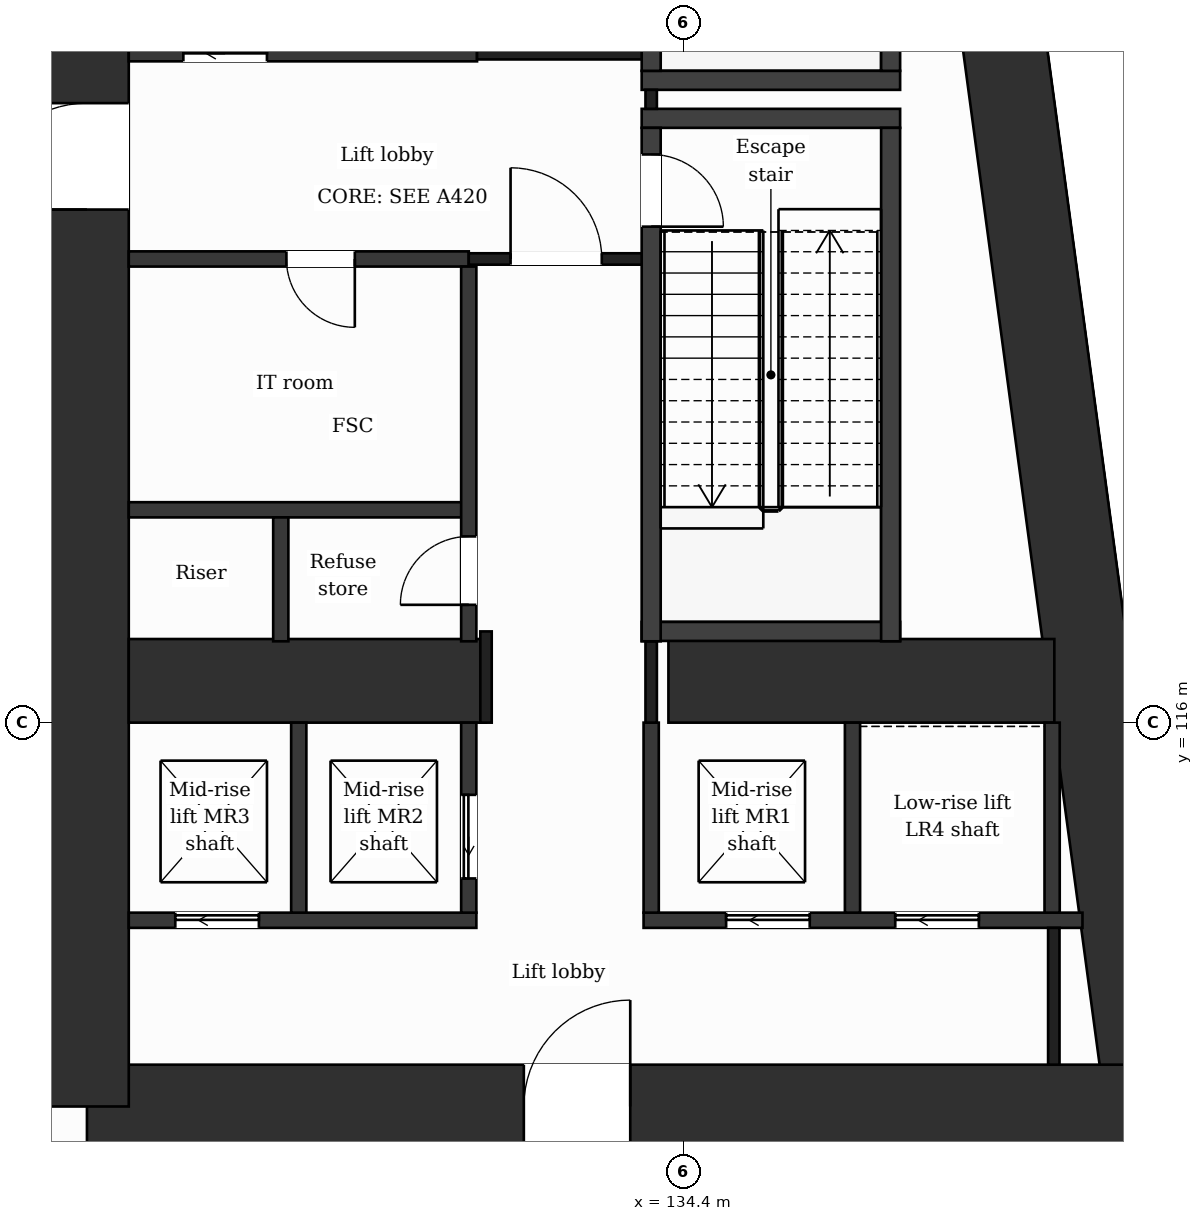
"""IFC4 building model, lengths in metres.
Left out: names, types, materials, properties, quantities, classifications, styles, units other than length and angle.
Written with IfcOpenShell. Run it as: python <this file> out.ifc"""

import sys

from ifc_helpers import new_model, si_unit, direction, frame, frame_2d, origin, place, context, subcontext, project, spatial, rectangle, extrude, element, fill, save


model = new_model("IFC4")
c1 = context("Model", 3, precision=1e-05, world=origin(), true_north=direction((0.0, 1.0)))
c2 = subcontext(c1, "Body", "Model", "MODEL_VIEW")
j1 = project(units=[si_unit("LENGTHUNIT", "METRE"), si_unit("PLANEANGLEUNIT", "RADIAN")], contexts=[c1])
p1 = place(None, origin())
s1 = spatial("IfcSite", under=j1, at=p1, CompositionType="ELEMENT")
p2 = place(p1, origin())
s2 = spatial("IfcBuilding", under=s1, at=p2, CompositionType="ELEMENT")
p3 = place(p2, frame((0.0, 0.0, 86.0)))
s3 = spatial("IfcBuildingStorey", under=s2, at=p3, CompositionType="ELEMENT", Elevation=86.0)
p4 = place(p3, frame((137.688, 131.85, 0.0), z_axis=(0.0, 0.0, 1.0), x_axis=(0.133411793472, -0.991060691059, 0.0)))
e1 = element("IfcWall", 1, at=p4, inside=s3, PredefinedType="SHEAR", context=c2, shape_type="SweptSolid", body=[
    extrude(rectangle(XDim=21.089, YDim=1.1, at=frame_2d((10.544, 0.0))), origin(), (0.0, 0.0, 1.0), 5.0),
])
p5 = place(p3, frame((140.502, 110.95, 0.0), z_axis=(0.0, 0.0, 1.0), x_axis=(-1.0, 0.0, 0.0)))
e2 = element("IfcWall", 2, at=p5, inside=s3, PredefinedType="SHEAR", context=c2, shape_type="SweptSolid", body=[
    extrude(rectangle(XDim=13.952, YDim=1.1, at=frame_2d((6.976, 0.0))), origin(), (0.0, 0.0, 1.0), 5.0),
])
p6 = place(p5, frame((6.804, 0.0, 0.0)))
e3 = element("IfcOpeningElement", 3, at=p6, cuts=e2, PredefinedType="OPENING", context=c2, shape_type="SweptSolid", body=[
    extrude(rectangle(XDim=1.4, YDim=2.1, at=frame_2d((0.7, 1.05))), frame((0.0, 0.56, 0.0), z_axis=(0.0, -1.0, 0.0), x_axis=(1.0, 0.0, 0.0)), (0.0, 0.0, 1.0), 1.12),
])
p7 = place(p3, frame((126.55, 110.95, 0.0), z_axis=(0.0, 0.0, 1.0), x_axis=(0.0, 1.0, 0.0)))
e4 = element("IfcWall", 4, at=p7, inside=s3, PredefinedType="SHEAR", context=c2, shape_type="SweptSolid", body=[
    extrude(rectangle(XDim=20.9, YDim=1.1, at=frame_2d((10.45, 0.0))), origin(), (0.0, 0.0, 1.0), 5.0),
])
p8 = place(p7, frame((11.8, 0.0, 0.0)))
e5 = element("IfcOpeningElement", 5, at=p8, cuts=e4, PredefinedType="OPENING", context=c2, shape_type="SweptSolid", body=[
    extrude(rectangle(XDim=1.4, YDim=2.1, at=frame_2d((0.7, 1.05))), frame((0.0, 0.56, 0.0), z_axis=(0.0, -1.0, 0.0), x_axis=(1.0, 0.0, 0.0)), (0.0, 0.0, 1.0), 1.12),
])
p9 = place(p3, frame((127.1, 116.55, 0.0), z_axis=(0.0, 0.0, 1.0), x_axis=(1.0, 0.0, 0.0)))
e6 = element("IfcWall", 6, at=p9, inside=s3, PredefinedType="SHEAR", context=c2, shape_type="SweptSolid", body=[
    extrude(rectangle(XDim=4.7, YDim=1.1, at=frame_2d((2.35, 0.0))), origin(), (0.0, 0.0, 1.0), 5.0),
])
p10 = place(p3, frame((134.2, 116.55, 0.0), z_axis=(0.0, 0.0, 1.0), x_axis=(1.0, 0.0, 0.0)))
e7 = element("IfcWall", 7, at=p10, inside=s3, PredefinedType="SHEAR", context=c2, shape_type="SweptSolid", body=[
    extrude(rectangle(XDim=5.077, YDim=1.1, at=frame_2d((2.539, 0.0))), origin(), (0.0, 0.0, 1.0), 5.0),
])
p11 = place(p3, frame((127.1, 113.4, 0.0), z_axis=(0.0, 0.0, 1.0), x_axis=(1.0, 0.0, 0.0)))
e8 = element("IfcWall", 8, at=p11, inside=s3, PredefinedType="PARTITIONING", context=c2, shape_type="SweptSolid", body=[
    extrude(rectangle(XDim=4.573, YDim=0.2, at=frame_2d((2.287, 0.0))), origin(), (0.0, 0.0, 1.0), 4.68),
])
p12 = place(p11, frame((0.612, 0.0, 0.0)))
e9 = element("IfcOpeningElement", 9, at=p12, cuts=e8, PredefinedType="OPENING", context=c2, shape_type="SweptSolid", body=[
    extrude(rectangle(XDim=1.1, YDim=2.1, at=frame_2d((0.55, 1.05))), frame((0.0, 0.11, 0.0), z_axis=(0.0, -1.0, 0.0), x_axis=(1.0, 0.0, 0.0)), (0.0, 0.0, 1.0), 0.22),
])
p13 = place(p3, frame((133.873, 113.4, 0.0), z_axis=(0.0, 0.0, 1.0), x_axis=(1.0, 0.0, 0.0)))
e10 = element("IfcWall", 10, at=p13, inside=s3, PredefinedType="PARTITIONING", context=c2, shape_type="SweptSolid", body=[
    extrude(rectangle(XDim=5.774, YDim=0.2, at=frame_2d((2.887, 0.0))), origin(), (0.0, 0.0, 1.0), 4.68),
])
p14 = place(p13, frame((3.311, 0.0, 0.0)))
e11 = element("IfcOpeningElement", 11, at=p14, cuts=e10, PredefinedType="OPENING", context=c2, shape_type="SweptSolid", body=[
    extrude(rectangle(XDim=1.1, YDim=2.1, at=frame_2d((0.55, 1.05))), frame((0.0, 0.11, 0.0), z_axis=(0.0, -1.0, 0.0), x_axis=(1.0, 0.0, 0.0)), (0.0, 0.0, 1.0), 0.22),
])
p15 = place(p13, frame((1.086, 0.0, 0.0)))
e12 = element("IfcOpeningElement", 12, at=p15, cuts=e10, PredefinedType="OPENING", context=c2, shape_type="SweptSolid", body=[
    extrude(rectangle(XDim=1.1, YDim=2.1, at=frame_2d((0.55, 1.05))), frame((0.0, 0.11, 0.0), z_axis=(0.0, -1.0, 0.0), x_axis=(1.0, 0.0, 0.0)), (0.0, 0.0, 1.0), 0.22),
])
p16 = place(p3, frame((133.848, 117.2, 0.0), z_axis=(0.0, 0.0, 1.0), x_axis=(1.0, 0.0, 0.0)))
e13 = element("IfcWall", 13, at=p16, inside=s3, PredefinedType="PARTITIONING", context=c2, shape_type="SweptSolid", body=[
    extrude(rectangle(XDim=3.4, YDim=0.25, at=frame_2d((1.7, 0.0))), origin(), (0.0, 0.0, 1.0), 4.68),
])
p17 = place(p3, frame((127.1, 118.8, 0.0), z_axis=(0.0, 0.0, 1.0), x_axis=(1.0, 0.0, 0.0)))
e14 = element("IfcWall", 14, at=p17, inside=s3, PredefinedType="PARTITIONING", context=c2, shape_type="SweptSolid", body=[
    extrude(rectangle(XDim=4.473, YDim=0.2, at=frame_2d((2.236, 0.0))), origin(), (0.0, 0.0, 1.0), 4.68),
])
p18 = place(p3, frame((127.1, 122.1, 0.0), z_axis=(0.0, 0.0, 1.0), x_axis=(1.0, 0.0, 0.0)))
e15 = element("IfcWall", 15, at=p18, inside=s3, PredefinedType="PARTITIONING", context=c2, shape_type="SweptSolid", body=[
    extrude(rectangle(XDim=4.473, YDim=0.2, at=frame_2d((2.236, 0.0))), origin(), (0.0, 0.0, 1.0), 4.68),
])
p19 = place(p18, frame((2.074, 0.0, 0.0)))
e16 = element("IfcOpeningElement", 16, at=p19, cuts=e15, PredefinedType="OPENING", context=c2, shape_type="SweptSolid", body=[
    extrude(rectangle(XDim=0.9, YDim=2.1, at=frame_2d((0.45, 1.05))), frame((0.0, 0.11, 0.0), z_axis=(0.0, -1.0, 0.0), x_axis=(1.0, 0.0, 0.0)), (0.0, 0.0, 1.0), 0.22),
])
p20 = place(p3, frame((131.573, 122.1, 0.0), z_axis=(0.0, 0.0, 1.0), x_axis=(1.0, 0.0, 0.0)))
e17 = element("IfcWall", 17, at=p20, inside=s3, PredefinedType="PARTITIONING", context=c2, shape_type="SweptSolid", body=[
    extrude(rectangle(XDim=2.4, YDim=0.15, at=frame_2d((1.2, 0.0))), origin(), (0.0, 0.0, 1.0), 4.68),
])
p21 = place(p20, frame((0.55, 0.0, 0.0)))
e18 = element("IfcOpeningElement", 18, at=p21, cuts=e17, PredefinedType="OPENING", context=c2, shape_type="SweptSolid", body=[
    extrude(rectangle(XDim=1.2, YDim=2.1, at=frame_2d((0.6, 1.05))), frame((0.0, 0.085, 0.0), z_axis=(0.0, -1.0, 0.0), x_axis=(1.0, 0.0, 0.0)), (0.0, 0.0, 1.0), 0.17),
])
for number, where, z_axis, x_axis in (
    (19, (133.848, 123.95, 0.0), (0.0, 0.0, 1.0), (1.0, 0.0, 0.0)),
    (20, (133.848, 124.45, 0.0), (0.0, 0.0, 1.0), (1.0, 0.0, 0.0)),
):
    element("IfcWall", number, at=place(p3, frame(where, z_axis=z_axis, x_axis=x_axis)), inside=s3, PredefinedType="PARTITIONING", context=c2, shape_type="SweptSolid", body=[
        extrude(rectangle(XDim=3.4, YDim=0.25, at=frame_2d((1.7, 0.0))), origin(), (0.0, 0.0, 1.0), 4.68),
    ])
p22 = place(p3, frame((127.1, 124.8, 0.0), z_axis=(0.0, 0.0, 1.0), x_axis=(1.0, 0.0, 0.0)))
e21 = element("IfcWall", 21, at=p22, inside=s3, PredefinedType="PARTITIONING", context=c2, shape_type="SweptSolid", body=[
    extrude(rectangle(XDim=4.582, YDim=0.2, at=frame_2d((2.291, 0.0))), origin(), (0.0, 0.0, 1.0), 4.68),
])
p23 = place(p22, frame((0.718, 0.0, 0.0)))
e22 = element("IfcOpeningElement", 22, at=p23, cuts=e21, PredefinedType="OPENING", context=c2, shape_type="SweptSolid", body=[
    extrude(rectangle(XDim=1.1, YDim=2.1, at=frame_2d((0.55, 1.05))), frame((0.0, 0.11, 0.0), z_axis=(0.0, -1.0, 0.0), x_axis=(1.0, 0.0, 0.0)), (0.0, 0.0, 1.0), 0.22),
])
p24 = place(p3, frame((131.682, 124.8, 0.0), z_axis=(0.0, 0.0, 1.0), x_axis=(1.0, 0.0, 0.0)))
e23 = element("IfcWall", 23, at=p24, inside=s3, PredefinedType="PARTITIONING", context=c2, shape_type="SweptSolid", body=[
    extrude(rectangle(XDim=2.416, YDim=0.15, at=frame_2d((1.208, 0.0))), origin(), (0.0, 0.0, 1.0), 4.68),
])
p25 = place(p3, frame((129.1, 117.07, 0.0), z_axis=(0.0, 0.0, 1.0), x_axis=(0.0, 1.0, 0.0)))
e24 = element("IfcWall", 24, at=p25, inside=s3, PredefinedType="PARTITIONING", context=c2, shape_type="SweptSolid", body=[
    extrude(rectangle(XDim=1.63, YDim=0.2, at=frame_2d((0.815, 0.0))), origin(), (0.0, 0.0, 1.0), 4.68),
])
p26 = place(p3, frame((129.336, 113.5, 0.0), z_axis=(0.0, 0.0, 1.0), x_axis=(0.0, 1.0, 0.0)))
e25 = element("IfcWall", 25, at=p26, inside=s3, PredefinedType="PARTITIONING", context=c2, shape_type="SweptSolid", body=[
    extrude(rectangle(XDim=2.5, YDim=0.2, at=frame_2d((1.25, 0.0))), origin(), (0.0, 0.0, 1.0), 4.68),
])
p27 = place(p3, frame((131.573, 113.5, 0.0), z_axis=(0.0, 0.0, 1.0), x_axis=(0.0, 1.0, 0.0)))
e26 = element("IfcWall", 26, at=p27, inside=s3, PredefinedType="PARTITIONING", context=c2, shape_type="SweptSolid", body=[
    extrude(rectangle(XDim=2.5, YDim=0.2, at=frame_2d((1.25, 0.0))), origin(), (0.0, 0.0, 1.0), 4.68),
])
p28 = place(p27, frame((0.45, 0.0, 0.0)))
e27 = element("IfcOpeningElement", 27, at=p28, cuts=e26, PredefinedType="OPENING", context=c2, shape_type="SweptSolid", body=[
    extrude(rectangle(XDim=1.1, YDim=2.1, at=frame_2d((0.55, 1.05))), frame((0.0, 0.11, 0.0), z_axis=(0.0, -1.0, 0.0), x_axis=(1.0, 0.0, 0.0)), (0.0, 0.0, 1.0), 0.22),
])
p29 = place(p3, frame((131.573, 117.07, 0.0), z_axis=(0.0, 0.0, 1.0), x_axis=(0.0, 1.0, 0.0)))
e28 = element("IfcWall", 28, at=p29, inside=s3, PredefinedType="PARTITIONING", context=c2, shape_type="SweptSolid", body=[
    extrude(rectangle(XDim=4.93, YDim=0.2, at=frame_2d((2.465, 0.0))), origin(), (0.0, 0.0, 1.0), 4.68),
])
p30 = place(p29, frame((0.48, 0.0, 0.0)))
e29 = element("IfcOpeningElement", 29, at=p30, cuts=e28, PredefinedType="OPENING", context=c2, shape_type="SweptSolid", body=[
    extrude(rectangle(XDim=0.9, YDim=2.1, at=frame_2d((0.45, 1.05))), frame((0.0, 0.11, 0.0), z_axis=(0.0, -1.0, 0.0), x_axis=(1.0, 0.0, 0.0)), (0.0, 0.0, 1.0), 0.22),
])
p31 = place(p3, frame((131.8, 116.0, 0.0), z_axis=(0.0, 0.0, 1.0), x_axis=(0.0, 1.0, 0.0)))
e30 = element("IfcWall", 30, at=p31, inside=s3, PredefinedType="PARTITIONING", context=c2, shape_type="SweptSolid", body=[
    extrude(rectangle(XDim=1.2, YDim=0.15, at=frame_2d((0.6, 0.0))), origin(), (0.0, 0.0, 1.0), 4.68),
])
p32 = place(p3, frame((133.973, 113.5, 0.0), z_axis=(0.0, 0.0, 1.0), x_axis=(0.0, 1.0, 0.0)))
e31 = element("IfcWall", 31, at=p32, inside=s3, PredefinedType="PARTITIONING", context=c2, shape_type="SweptSolid", body=[
    extrude(rectangle(XDim=2.5, YDim=0.2, at=frame_2d((1.25, 0.0))), origin(), (0.0, 0.0, 1.0), 4.68),
])
p33 = place(p3, frame((133.973, 116.0, 0.0), z_axis=(0.0, 0.0, 1.0), x_axis=(0.0, 1.0, 0.0)))
e32 = element("IfcWall", 32, at=p33, inside=s3, PredefinedType="PARTITIONING", context=c2, shape_type="SweptSolid", body=[
    extrude(rectangle(XDim=1.07, YDim=0.15, at=frame_2d((0.535, 0.0))), origin(), (0.0, 0.0, 1.0), 4.68),
])
p34 = place(p3, frame((133.973, 124.075, 0.0), z_axis=(0.0, 0.0, 1.0), x_axis=(0.0, 1.0, 0.0)))
e33 = element("IfcWall", 33, at=p34, inside=s3, PredefinedType="PARTITIONING", context=c2, shape_type="SweptSolid", body=[
    extrude(rectangle(XDim=0.25, YDim=0.15, at=frame_2d((0.125, 0.0))), origin(), (0.0, 0.0, 1.0), 4.68),
])
p35 = place(p3, frame((133.973, 117.07, 0.0), z_axis=(0.0, 0.0, 1.0), x_axis=(0.0, 1.0, 0.0)))
e34 = element("IfcWall", 34, at=p35, inside=s3, PredefinedType="PARTITIONING", context=c2, shape_type="SweptSolid", body=[
    extrude(rectangle(XDim=6.755, YDim=0.25, at=frame_2d((3.377, 0.0))), origin(), (0.0, 0.0, 1.0), 4.68),
])
p36 = place(p35, frame((5.455, 0.0, 0.0)))
e35 = element("IfcOpeningElement", 35, at=p36, cuts=e34, PredefinedType="OPENING", context=c2, shape_type="SweptSolid", body=[
    extrude(rectangle(XDim=0.95, YDim=2.1, at=frame_2d((0.475, 1.05))), frame((0.0, 0.135, 0.0), z_axis=(0.0, -1.0, 0.0), x_axis=(1.0, 0.0, 0.0)), (0.0, 0.0, 1.0), 0.27),
])
p37 = place(p3, frame((133.973, 124.575, 0.0), z_axis=(0.0, 0.0, 1.0), x_axis=(0.0, 1.0, 0.0)))
e36 = element("IfcWall", 36, at=p37, inside=s3, PredefinedType="PARTITIONING", context=c2, shape_type="SweptSolid", body=[
    extrude(rectangle(XDim=6.755, YDim=0.25, at=frame_2d((3.377, 0.0))), origin(), (0.0, 0.0, 1.0), 4.68),
])
p38 = place(p37, frame((5.325, 0.0, 0.0)))
e37 = element("IfcOpeningElement", 37, at=p38, cuts=e36, PredefinedType="OPENING", context=c2, shape_type="SweptSolid", body=[
    extrude(rectangle(XDim=1.0, YDim=2.1, at=frame_2d((0.5, 1.05))), frame((0.0, 0.135, 0.0), z_axis=(0.0, -1.0, 0.0), x_axis=(1.0, 0.0, 0.0)), (0.0, 0.0, 1.0), 0.27),
])
p39 = place(p3, frame((136.622, 113.5, 0.0), z_axis=(0.0, 0.0, 1.0), x_axis=(0.0, 1.0, 0.0)))
e38 = element("IfcWall", 38, at=p39, inside=s3, PredefinedType="PARTITIONING", context=c2, shape_type="SweptSolid", body=[
    extrude(rectangle(XDim=2.5, YDim=0.2, at=frame_2d((1.25, 0.0))), origin(), (0.0, 0.0, 1.0), 4.68),
])
p40 = place(p3, frame((137.123, 117.07, 0.0), z_axis=(0.0, 0.0, 1.0), x_axis=(0.0, 1.0, 0.0)))
e39 = element("IfcWall", 39, at=p40, inside=s3, PredefinedType="PARTITIONING", context=c2, shape_type="SweptSolid", body=[
    extrude(rectangle(XDim=6.755, YDim=0.25, at=frame_2d((3.377, 0.0))), origin(), (0.0, 0.0, 1.0), 4.68),
])
p41 = place(p3, frame((137.123, 124.575, 0.0), z_axis=(0.0, 0.0, 1.0), x_axis=(0.0, 1.0, 0.0)))
e40 = element("IfcWall", 40, at=p41, inside=s3, PredefinedType="PARTITIONING", context=c2, shape_type="SweptSolid", body=[
    extrude(rectangle(XDim=6.5, YDim=0.25, at=frame_2d((3.25, 0.0))), origin(), (0.0, 0.0, 1.0), 4.68),
])
p42 = place(p3, frame((139.248, 113.5, 0.0), z_axis=(0.0, 0.0, 1.0), x_axis=(0.0, 1.0, 0.0)))
e41 = element("IfcWall", 41, at=p42, inside=s3, PredefinedType="PARTITIONING", context=c2, shape_type="SweptSolid", body=[
    extrude(rectangle(XDim=2.5, YDim=0.2, at=frame_2d((1.25, 0.0))), origin(), (0.0, 0.0, 1.0), 4.68),
])
p43 = place(p3, frame((139.27, 111.5, 0.0), z_axis=(0.0, 0.0, 1.0), x_axis=(0.0, 1.0, 0.0)))
e42 = element("IfcWall", 42, at=p43, inside=s3, PredefinedType="PARTITIONING", context=c2, shape_type="SweptSolid", body=[
    extrude(rectangle(XDim=1.8, YDim=0.15, at=frame_2d((0.9, 0.0))), origin(), (0.0, 0.0, 1.0), 4.68),
])
p44 = place(p21, origin())
e43 = element("IfcDoor", 43, at=p44, inside=s3, OperationType="SINGLE_SWING_LEFT", PredefinedType="DOOR", context=c2, shape_type="SweptSolid", body=[
    extrude(rectangle(XDim=1.2, YDim=2.1, at=frame_2d((0.6, 1.05))), frame((0.0, 0.025, 0.0), z_axis=(0.0, -1.0, 0.0), x_axis=(1.0, 0.0, 0.0)), (0.0, 0.0, 1.0), 0.05),
])
fill(e18, e43)
p45 = place(p23, origin())
e44 = element("IfcDoor", 44, at=p45, inside=s3, OperationType="SLIDING_TO_LEFT", PredefinedType="DOOR", context=c2, shape_type="SweptSolid", body=[
    extrude(rectangle(XDim=1.1, YDim=2.1, at=frame_2d((0.55, 1.05))), frame((0.0, 0.025, 0.0), z_axis=(0.0, -1.0, 0.0), x_axis=(1.0, 0.0, 0.0)), (0.0, 0.0, 1.0), 0.05),
])
fill(e22, e44)
p46 = place(p19, origin())
e45 = element("IfcDoor", 45, at=p46, inside=s3, OperationType="SINGLE_SWING_RIGHT", PredefinedType="DOOR", context=c2, shape_type="SweptSolid", body=[
    extrude(rectangle(XDim=0.9, YDim=2.1, at=frame_2d((0.45, 1.05))), frame((0.0, 0.025, 0.0), z_axis=(0.0, -1.0, 0.0), x_axis=(1.0, 0.0, 0.0)), (0.0, 0.0, 1.0), 0.05),
])
fill(e16, e45)
p47 = place(p36, origin())
e46 = element("IfcDoor", 46, at=p47, inside=s3, OperationType="SINGLE_SWING_LEFT", PredefinedType="DOOR", context=c2, shape_type="SweptSolid", body=[
    extrude(rectangle(XDim=0.95, YDim=2.1, at=frame_2d((0.475, 1.05))), frame((0.0, 0.025, 0.0), z_axis=(0.0, -1.0, 0.0), x_axis=(1.0, 0.0, 0.0)), (0.0, 0.0, 1.0), 0.05),
])
fill(e35, e46)
p48 = place(p30, origin())
e47 = element("IfcDoor", 47, at=p48, inside=s3, OperationType="SINGLE_SWING_LEFT", PredefinedType="DOOR", context=c2, shape_type="SweptSolid", body=[
    extrude(rectangle(XDim=0.9, YDim=2.1, at=frame_2d((0.45, 1.05))), frame((0.0, 0.025, 0.0), z_axis=(0.0, -1.0, 0.0), x_axis=(1.0, 0.0, 0.0)), (0.0, 0.0, 1.0), 0.05),
])
fill(e29, e47)
p49 = place(p14, origin())
e48 = element("IfcDoor", 48, at=p49, inside=s3, OperationType="SLIDING_TO_LEFT", PredefinedType="DOOR", context=c2, shape_type="SweptSolid", body=[
    extrude(rectangle(XDim=1.1, YDim=2.1, at=frame_2d((0.55, 1.05))), frame((0.0, 0.025, 0.0), z_axis=(0.0, -1.0, 0.0), x_axis=(1.0, 0.0, 0.0)), (0.0, 0.0, 1.0), 0.05),
])
fill(e11, e48)
p50 = place(p15, origin())
e49 = element("IfcDoor", 49, at=p50, inside=s3, OperationType="SLIDING_TO_LEFT", PredefinedType="DOOR", context=c2, shape_type="SweptSolid", body=[
    extrude(rectangle(XDim=1.1, YDim=2.1, at=frame_2d((0.55, 1.05))), frame((0.0, 0.025, 0.0), z_axis=(0.0, -1.0, 0.0), x_axis=(1.0, 0.0, 0.0)), (0.0, 0.0, 1.0), 0.05),
])
fill(e12, e49)
p51 = place(p28, origin())
e50 = element("IfcDoor", 50, at=p51, inside=s3, OperationType="SLIDING_TO_LEFT", PredefinedType="DOOR", context=c2, shape_type="SweptSolid", body=[
    extrude(rectangle(XDim=1.1, YDim=2.1, at=frame_2d((0.55, 1.05))), frame((0.0, 0.025, 0.0), z_axis=(0.0, -1.0, 0.0), x_axis=(1.0, 0.0, 0.0)), (0.0, 0.0, 1.0), 0.05),
])
fill(e27, e50)
p52 = place(p12, origin())
e51 = element("IfcDoor", 51, at=p52, inside=s3, OperationType="SLIDING_TO_LEFT", PredefinedType="DOOR", context=c2, shape_type="SweptSolid", body=[
    extrude(rectangle(XDim=1.1, YDim=2.1, at=frame_2d((0.55, 1.05))), frame((0.0, 0.025, 0.0), z_axis=(0.0, -1.0, 0.0), x_axis=(1.0, 0.0, 0.0)), (0.0, 0.0, 1.0), 0.05),
])
fill(e9, e51)
p53 = place(p6, origin())
e52 = element("IfcDoor", 52, at=p53, inside=s3, OperationType="SINGLE_SWING_LEFT", PredefinedType="DOOR", context=c2, shape_type="SweptSolid", body=[
    extrude(rectangle(XDim=1.4, YDim=2.1, at=frame_2d((0.7, 1.05))), frame((0.0, 0.025, 0.0), z_axis=(0.0, -1.0, 0.0), x_axis=(1.0, 0.0, 0.0)), (0.0, 0.0, 1.0), 0.05),
])
fill(e3, e52)
p54 = place(p8, origin())
e53 = element("IfcDoor", 53, at=p54, inside=s3, OperationType="SINGLE_SWING_LEFT", PredefinedType="DOOR", context=c2, shape_type="SweptSolid", body=[
    extrude(rectangle(XDim=1.4, YDim=2.1, at=frame_2d((0.7, 1.05))), frame((0.0, 0.025, 0.0), z_axis=(0.0, -1.0, 0.0), x_axis=(1.0, 0.0, 0.0)), (0.0, 0.0, 1.0), 0.05),
])
fill(e5, e53)
save(model, sys.argv[1])
